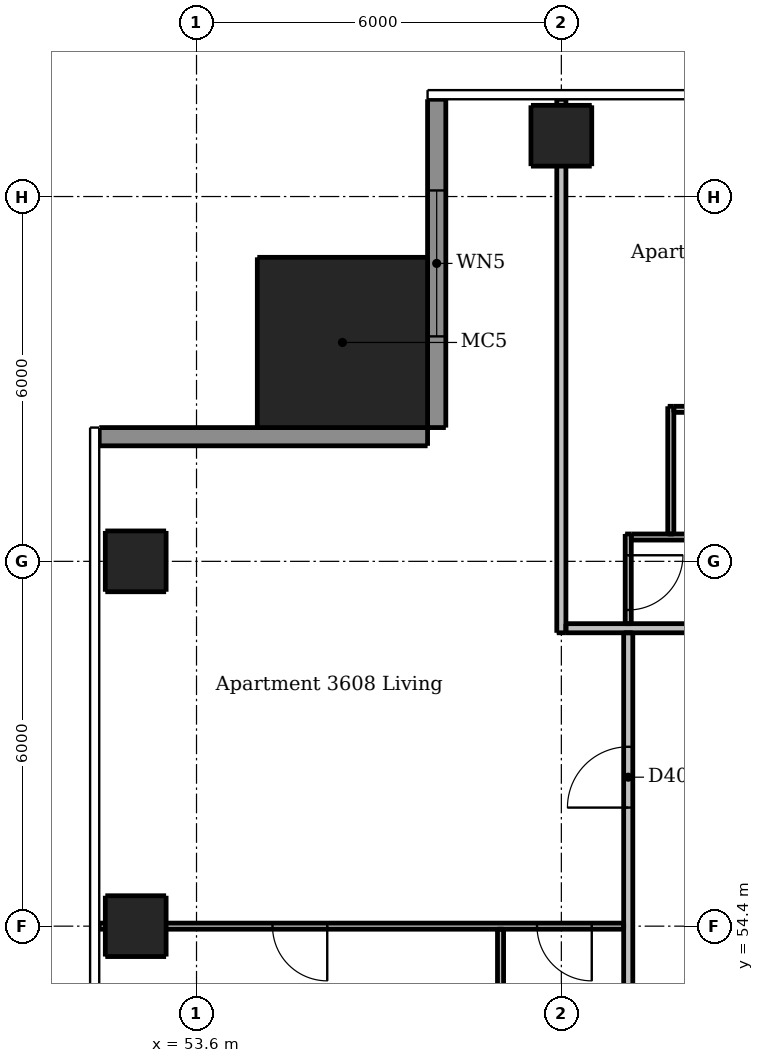
"""IFC4 building model, lengths in metres.
Left out: names, types, materials, properties, quantities, classifications, styles, units other than length and angle.
Written with IfcOpenShell. Run it as: python <this file> out.ifc"""

import sys

from ifc_helpers import new_model, si_unit, direction, frame, frame_2d, origin, origin_2d, place, context, subcontext, project, spatial, rectangle, extrude, element, fill, save


model = new_model("IFC4")
c1 = context("Model", 3, precision=1e-05, world=origin(), true_north=direction((0.0, 1.0)))
c2 = subcontext(c1, "Body", "Model", "MODEL_VIEW")
j1 = project(units=[si_unit("LENGTHUNIT", "METRE"), si_unit("PLANEANGLEUNIT", "RADIAN")], contexts=[c1])
p1 = place(None, origin())
s1 = spatial("IfcSite", under=j1, at=p1, CompositionType="ELEMENT")
p2 = place(p1, origin())
s2 = spatial("IfcBuilding", under=s1, at=p2, CompositionType="ELEMENT")
p3 = place(p2, frame((0.0, 0.0, 137.2)))
s3 = spatial("IfcBuildingStorey", under=s2, at=p3, CompositionType="ELEMENT", Elevation=137.2)
for number, where, z_axis, x_axis in (
    (1, (59.6, 67.4, 0.0), (0.0, 0.0, 1.0), (1.0, 0.0, 0.0)),
    (2, (52.6, 54.4, 0.0), (0.0, 0.0, 1.0), (1.0, 0.0, 0.0)),
    (3, (52.6, 60.4, 0.0), (0.0, 0.0, 1.0), (1.0, 0.0, 0.0)),
):
    element("IfcColumn", number, at=place(p3, frame(where, z_axis=z_axis, x_axis=x_axis)), inside=s3, PredefinedType="COLUMN", context=c2, shape_type="SweptSolid", body=[
        extrude(rectangle(XDim=1.0, YDim=1.0, at=origin_2d()), origin(), (0.0, 0.0, 1.0), 3.05),
    ])
p4 = place(p3, frame((56.0, 64.0, 0.0), z_axis=(0.0, 0.0, 1.0), x_axis=(1.0, 0.0, 0.0)))
e4 = element("IfcColumn", 4, at=p4, inside=s3, PredefinedType="COLUMN", context=c2, shape_type="SweptSolid", body=[
    extrude(rectangle(XDim=2.8, YDim=2.8, at=origin_2d()), origin(), (0.0, 0.0, 1.0), 3.3),
])
p5 = place(p3, frame((57.55, 68.0, 0.0), z_axis=(0.0, 0.0, 1.0), x_axis=(0.0, -1.0, 0.0)))
e5 = element("IfcWall", 5, at=p5, inside=s3, PredefinedType="SOLIDWALL", context=c2, shape_type="SweptSolid", body=[
    extrude(rectangle(XDim=5.4, YDim=0.3, at=frame_2d((2.7, 0.0))), origin(), (0.0, 0.0, 1.0), 3.05),
])
p6 = place(p5, frame((1.5, 0.0, 0.15)))
e6 = element("IfcOpeningElement", 6, at=p6, cuts=e5, PredefinedType="OPENING", context=c2, shape_type="SweptSolid", body=[
    extrude(rectangle(XDim=2.4, YDim=2.1, at=frame_2d((1.2, 1.05))), frame((0.0, 0.16, 0.0), z_axis=(0.0, -1.0, 0.0), x_axis=(1.0, 0.0, 0.0)), (0.0, 0.0, 1.0), 0.32),
])
p7 = place(p3, frame((57.4, 62.45, 0.0), z_axis=(0.0, 0.0, 1.0), x_axis=(-1.0, 0.0, 0.0)))
e7 = element("IfcWall", 7, at=p7, inside=s3, PredefinedType="SOLIDWALL", context=c2, shape_type="SweptSolid", body=[
    extrude(rectangle(XDim=5.4, YDim=0.3, at=frame_2d((2.7, 0.0))), origin(), (0.0, 0.0, 1.0), 3.05),
])
p8 = place(p3, frame((58.6, 54.35, 0.0), z_axis=(0.0, 0.0, 1.0), x_axis=(0.0, -1.0, 0.0)))
e8 = element("IfcWall", 8, at=p8, inside=s3, PredefinedType="PARTITIONING", context=c2, shape_type="SweptSolid", body=[
    extrude(rectangle(XDim=5.875, YDim=0.1, at=frame_2d((2.938, 0.0))), origin(), (0.0, 0.0, 1.0), 3.05),
])
p9 = place(p8, frame((3.75, 0.0, 0.0)))
e9 = element("IfcOpeningElement", 9, at=p9, cuts=e8, PredefinedType="OPENING", context=c2, shape_type="SweptSolid", body=[
    extrude(rectangle(XDim=0.8, YDim=2.1, at=frame_2d((0.4, 1.05))), frame((0.0, 0.06, 0.0), z_axis=(0.0, -1.0, 0.0), x_axis=(1.0, 0.0, 0.0)), (0.0, 0.0, 1.0), 0.12),
])
p10 = place(p3, frame((60.7, 60.85, 0.0), z_axis=(0.0, 0.0, 1.0), x_axis=(0.0, -1.0, 0.0)))
e10 = element("IfcWall", 10, at=p10, inside=s3, PredefinedType="PARTITIONING", context=c2, shape_type="SweptSolid", body=[
    extrude(rectangle(XDim=1.475, YDim=0.1, at=frame_2d((0.738, 0.0))), origin(), (0.0, 0.0, 1.0), 3.05),
])
p11 = place(p10, frame((0.35, 0.0, 0.0)))
e11 = element("IfcOpeningElement", 11, at=p11, cuts=e10, PredefinedType="OPENING", context=c2, shape_type="SweptSolid", body=[
    extrude(rectangle(XDim=0.9, YDim=2.1, at=frame_2d((0.45, 1.05))), frame((0.0, 0.06, 0.0), z_axis=(0.0, -1.0, 0.0), x_axis=(1.0, 0.0, 0.0)), (0.0, 0.0, 1.0), 0.12),
])
p12 = place(p3, frame((61.4, 60.85, 0.0), z_axis=(0.0, 0.0, 1.0), x_axis=(0.0, 1.0, 0.0)))
e12 = element("IfcWall", 12, at=p12, inside=s3, PredefinedType="PARTITIONING", context=c2, shape_type="SweptSolid", body=[
    extrude(rectangle(XDim=2.1, YDim=0.1, at=frame_2d((1.05, 0.0))), origin(), (0.0, 0.0, 1.0), 3.05),
])
p13 = place(p3, frame((61.45, 62.9, 0.0), z_axis=(0.0, 0.0, 1.0), x_axis=(1.0, 0.0, 0.0)))
e13 = element("IfcWall", 13, at=p13, inside=s3, PredefinedType="PARTITIONING", context=c2, shape_type="SweptSolid", body=[
    extrude(rectangle(XDim=6.5, YDim=0.1, at=frame_2d((3.25, 0.0))), origin(), (0.0, 0.0, 1.0), 3.05),
])
p14 = place(p3, frame((60.75, 60.8, 0.0), z_axis=(0.0, 0.0, 1.0), x_axis=(1.0, 0.0, 0.0)))
e14 = element("IfcWall", 14, at=p14, inside=s3, PredefinedType="PARTITIONING", context=c2, shape_type="SweptSolid", body=[
    extrude(rectangle(XDim=16.775, YDim=0.1, at=frame_2d((8.387, 0.0))), origin(), (0.0, 0.0, 1.0), 3.05),
])
p15 = place(p14, frame((3.2, 0.0, 0.0)))
e15 = element("IfcOpeningElement", 15, at=p15, cuts=e14, PredefinedType="OPENING", context=c2, shape_type="SweptSolid", body=[
    extrude(rectangle(XDim=0.9, YDim=2.1, at=frame_2d((0.45, 1.05))), frame((0.0, 0.06, 0.0), z_axis=(0.0, -1.0, 0.0), x_axis=(1.0, 0.0, 0.0)), (0.0, 0.0, 1.0), 0.12),
])
p16 = place(p14, frame((1.1, 0.0, 0.0)))
e16 = element("IfcOpeningElement", 16, at=p16, cuts=e14, PredefinedType="OPENING", context=c2, shape_type="SweptSolid", body=[
    extrude(rectangle(XDim=0.9, YDim=2.1, at=frame_2d((0.45, 1.05))), frame((0.0, 0.06, 0.0), z_axis=(0.0, -1.0, 0.0), x_axis=(1.0, 0.0, 0.0)), (0.0, 0.0, 1.0), 0.12),
])
p17 = place(p14, frame((8.6, 0.0, 0.0)))
e17 = element("IfcOpeningElement", 17, at=p17, cuts=e14, PredefinedType="OPENING", context=c2, shape_type="SweptSolid", body=[
    extrude(rectangle(XDim=0.9, YDim=2.1, at=frame_2d((0.45, 1.05))), frame((0.0, 0.06, 0.0), z_axis=(0.0, -1.0, 0.0), x_axis=(1.0, 0.0, 0.0)), (0.0, 0.0, 1.0), 0.12),
])
p18 = place(p14, frame((14.6, 0.0, 0.0)))
e18 = element("IfcOpeningElement", 18, at=p18, cuts=e14, PredefinedType="OPENING", context=c2, shape_type="SweptSolid", body=[
    extrude(rectangle(XDim=0.9, YDim=2.1, at=frame_2d((0.45, 1.05))), frame((0.0, 0.06, 0.0), z_axis=(0.0, -1.0, 0.0), x_axis=(1.0, 0.0, 0.0)), (0.0, 0.0, 1.0), 0.12),
])
p19 = place(p14, frame((5.65, 0.0, 0.0)))
e19 = element("IfcOpeningElement", 19, at=p19, cuts=e14, PredefinedType="OPENING", context=c2, shape_type="SweptSolid", body=[
    extrude(rectangle(XDim=0.8, YDim=2.1, at=frame_2d((0.4, 1.05))), frame((0.0, 0.06, 0.0), z_axis=(0.0, -1.0, 0.0), x_axis=(1.0, 0.0, 0.0)), (0.0, 0.0, 1.0), 0.12),
])
p20 = place(p14, frame((11.65, 0.0, 0.0)))
e20 = element("IfcOpeningElement", 20, at=p20, cuts=e14, PredefinedType="OPENING", context=c2, shape_type="SweptSolid", body=[
    extrude(rectangle(XDim=0.8, YDim=2.1, at=frame_2d((0.4, 1.05))), frame((0.0, 0.06, 0.0), z_axis=(0.0, -1.0, 0.0), x_axis=(1.0, 0.0, 0.0)), (0.0, 0.0, 1.0), 0.12),
])
p21 = place(p3, frame((60.625, 54.4, 0.0), z_axis=(0.0, 0.0, 1.0), x_axis=(-1.0, 0.0, 0.0)))
e21 = element("IfcWall", 21, at=p21, inside=s3, PredefinedType="PARTITIONING", context=c2, shape_type="SweptSolid", body=[
    extrude(rectangle(XDim=8.625, YDim=0.1, at=frame_2d((4.312, 0.0))), origin(), (0.0, 0.0, 1.0), 2.516),
])
p22 = place(p21, frame((0.525, 0.0, 0.0)))
e22 = element("IfcOpeningElement", 22, at=p22, cuts=e21, PredefinedType="OPENING", context=c2, shape_type="SweptSolid", body=[
    extrude(rectangle(XDim=0.9, YDim=2.1, at=frame_2d((0.45, 1.05))), frame((0.0, 0.06, 0.0), z_axis=(0.0, -1.0, 0.0), x_axis=(1.0, 0.0, 0.0)), (0.0, 0.0, 1.0), 0.12),
])
p23 = place(p21, frame((4.875, 0.0, 0.0)))
e23 = element("IfcOpeningElement", 23, at=p23, cuts=e21, PredefinedType="OPENING", context=c2, shape_type="SweptSolid", body=[
    extrude(rectangle(XDim=0.9, YDim=2.1, at=frame_2d((0.45, 1.05))), frame((0.0, 0.06, 0.0), z_axis=(0.0, -1.0, 0.0), x_axis=(1.0, 0.0, 0.0)), (0.0, 0.0, 1.0), 0.12),
])
p24 = place(p3, frame((59.6, 59.225, 0.0), z_axis=(0.0, 0.0, 1.0), x_axis=(0.0, 1.0, 0.0)))
e24 = element("IfcWall", 24, at=p24, inside=s3, PredefinedType="PARTITIONING", context=c2, shape_type="SweptSolid", body=[
    extrude(rectangle(XDim=8.775, YDim=0.15, at=frame_2d((4.387, 0.0))), origin(), (0.0, 0.0, 1.0), 2.51),
])
p25 = place(p3, frame((60.7, 30.325, 0.0), z_axis=(0.0, 0.0, 1.0), x_axis=(0.0, 1.0, 0.0)))
e25 = element("IfcWall", 25, at=p25, inside=s3, PredefinedType="PARTITIONING", context=c2, shape_type="SweptSolid", body=[
    extrude(rectangle(XDim=28.9, YDim=0.15, at=frame_2d((14.45, 0.0))), origin(), (0.0, 0.0, 1.0), 3.05),
])
p26 = place(p25, frame((9.225, 0.0, 0.0)))
e26 = element("IfcOpeningElement", 26, at=p26, cuts=e25, PredefinedType="OPENING", context=c2, shape_type="SweptSolid", body=[
    extrude(rectangle(XDim=1.0, YDim=2.1, at=frame_2d((0.5, 1.05))), frame((0.0, 0.085, 0.0), z_axis=(0.0, -1.0, 0.0), x_axis=(1.0, 0.0, 0.0)), (0.0, 0.0, 1.0), 0.17),
])
p27 = place(p25, frame((26.025, 0.0, 0.0)))
e27 = element("IfcOpeningElement", 27, at=p27, cuts=e25, PredefinedType="OPENING", context=c2, shape_type="SweptSolid", body=[
    extrude(rectangle(XDim=1.0, YDim=2.1, at=frame_2d((0.5, 1.05))), frame((0.0, 0.085, 0.0), z_axis=(0.0, -1.0, 0.0), x_axis=(1.0, 0.0, 0.0)), (0.0, 0.0, 1.0), 0.17),
])
p28 = place(p3, frame((59.675, 59.3, 0.0), z_axis=(0.0, 0.0, 1.0), x_axis=(1.0, 0.0, 0.0)))
e28 = element("IfcWall", 28, at=p28, inside=s3, PredefinedType="PARTITIONING", context=c2, shape_type="SweptSolid", body=[
    extrude(rectangle(XDim=28.55, YDim=0.15, at=frame_2d((14.275, 0.0))), origin(), (0.0, 0.0, 1.0), 3.05),
])
p29 = place(p28, frame((8.975, 0.0, 0.0)))
e29 = element("IfcOpeningElement", 29, at=p29, cuts=e28, PredefinedType="OPENING", context=c2, shape_type="SweptSolid", body=[
    extrude(rectangle(XDim=1.0, YDim=2.1, at=frame_2d((0.5, 1.05))), frame((0.0, 0.085, 0.0), z_axis=(0.0, -1.0, 0.0), x_axis=(1.0, 0.0, 0.0)), (0.0, 0.0, 1.0), 0.17),
])
p30 = place(p28, frame((25.775, 0.0, 0.0)))
e30 = element("IfcOpeningElement", 30, at=p30, cuts=e28, PredefinedType="OPENING", context=c2, shape_type="SweptSolid", body=[
    extrude(rectangle(XDim=1.0, YDim=2.1, at=frame_2d((0.5, 1.05))), frame((0.0, 0.085, 0.0), z_axis=(0.0, -1.0, 0.0), x_axis=(1.0, 0.0, 0.0)), (0.0, 0.0, 1.0), 0.17),
])
p31 = place(p6, origin())
e31 = element("IfcWindow", 31, at=p31, inside=s3, PartitioningType="DOUBLE_PANEL_VERTICAL", PredefinedType="WINDOW", context=c2, shape_type="SweptSolid", body=[
    extrude(rectangle(XDim=2.4, YDim=2.1, at=frame_2d((1.2, 1.05))), frame((0.0, 0.03, 0.0), z_axis=(0.0, -1.0, 0.0), x_axis=(1.0, 0.0, 0.0)), (0.0, 0.0, 1.0), 0.06),
])
fill(e6, e31)
p32 = place(p11, origin())
e32 = element("IfcDoor", 32, at=p32, inside=s3, OperationType="SINGLE_SWING_LEFT", PredefinedType="DOOR", context=c2, shape_type="SweptSolid", body=[
    extrude(rectangle(XDim=0.9, YDim=2.1, at=frame_2d((0.45, 1.05))), frame((0.0, 0.025, 0.0), z_axis=(0.0, -1.0, 0.0), x_axis=(1.0, 0.0, 0.0)), (0.0, 0.0, 1.0), 0.05),
])
fill(e11, e32)
p33 = place(p27, origin())
e33 = element("IfcDoor", 33, at=p33, inside=s3, OperationType="SINGLE_SWING_LEFT", PredefinedType="DOOR", context=c2, shape_type="SweptSolid", body=[
    extrude(rectangle(XDim=1.0, YDim=2.1, at=frame_2d((0.5, 1.05))), frame((0.0, 0.025, 0.0), z_axis=(0.0, -1.0, 0.0), x_axis=(1.0, 0.0, 0.0)), (0.0, 0.0, 1.0), 0.05),
])
fill(e27, e33)
p34 = place(p22, origin())
e34 = element("IfcDoor", 34, at=p34, inside=s3, OperationType="SINGLE_SWING_LEFT", PredefinedType="DOOR", context=c2, shape_type="SweptSolid", body=[
    extrude(rectangle(XDim=0.9, YDim=2.1, at=frame_2d((0.45, 1.05))), frame((0.0, 0.025, 0.0), z_axis=(0.0, -1.0, 0.0), x_axis=(1.0, 0.0, 0.0)), (0.0, 0.0, 1.0), 0.05),
])
fill(e22, e34)
p35 = place(p23, origin())
e35 = element("IfcDoor", 35, at=p35, inside=s3, OperationType="SINGLE_SWING_LEFT", PredefinedType="DOOR", context=c2, shape_type="SweptSolid", body=[
    extrude(rectangle(XDim=0.9, YDim=2.1, at=frame_2d((0.45, 1.05))), frame((0.0, 0.025, 0.0), z_axis=(0.0, -1.0, 0.0), x_axis=(1.0, 0.0, 0.0)), (0.0, 0.0, 1.0), 0.05),
])
fill(e23, e35)
save(model, sys.argv[1])
